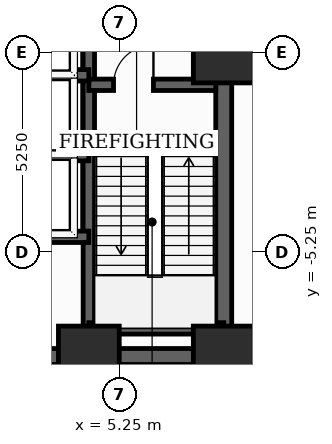
"""IFC4 building model, lengths in metres.
Left out: names, types, materials, properties, quantities, classifications, styles, units other than length and angle.
Written with IfcOpenShell. Run it as: python <this file> out.ifc"""

import sys

from ifc_helpers import new_model, si_unit, direction, frame, frame_2d, origin, origin_2d, place, context, subcontext, project, spatial, rectangle, extrude, element, fill, save


model = new_model("IFC4")
c1 = context("Model", 3, precision=1e-05, world=origin(), true_north=direction((0.0, 1.0)))
c2 = subcontext(c1, "Body", "Model", "MODEL_VIEW")
j1 = project(units=[si_unit("LENGTHUNIT", "METRE"), si_unit("PLANEANGLEUNIT", "RADIAN")], contexts=[c1])
p1 = place(None, origin())
s1 = spatial("IfcSite", under=j1, at=p1, CompositionType="ELEMENT")
p2 = place(p1, origin())
s2 = spatial("IfcBuilding", under=s1, at=p2, CompositionType="ELEMENT")
p3 = place(p2, frame((0.0, 0.0, 5.2)))
s3 = spatial("IfcBuildingStorey", under=s2, at=p3, CompositionType="ELEMENT", Elevation=5.2)
for number, where, z_axis, x_axis in (
    (1, (4.45, -8.0, 0.0), (0.0, 0.0, 1.0), (1.0, 0.0, 0.0)),
    (2, (8.0, -8.0, 0.0), (0.0, 0.0, 1.0), (1.0, 0.0, 0.0)),
    (3, (8.0, 0.0, 0.0), (0.0, 0.0, 1.0), (1.0, 0.0, 0.0)),
):
    element("IfcColumn", number, at=place(p3, frame(where, z_axis=z_axis, x_axis=x_axis)), inside=s3, PredefinedType="COLUMN", context=c2, shape_type="SweptSolid", body=[
        extrude(rectangle(XDim=1.6, YDim=1.6, at=origin_2d()), origin(), (0.0, 0.0, 1.0), 5.2),
    ])
p4 = place(p3, frame((8.0, -8.0, 0.0), z_axis=(0.0, 0.0, 1.0), x_axis=(0.0, 1.0, 0.0)))
e4 = element("IfcWall", 4, at=p4, inside=s3, PredefinedType="SHEAR", context=c2, shape_type="SweptSolid", body=[
    extrude(rectangle(XDim=16.0, YDim=0.42, at=frame_2d((8.0, 0.0))), origin(), (0.0, 0.0, 1.0), 4.95),
])
p5 = place(p4, frame((9.6, 0.0, 0.0)))
e5 = element("IfcOpeningElement", 5, at=p5, cuts=e4, PredefinedType="OPENING", context=c2, shape_type="SweptSolid", body=[
    extrude(rectangle(XDim=1.05, YDim=2.15, at=frame_2d((0.525, 1.075))), frame((0.0, 0.22, 0.0), z_axis=(0.0, -1.0, 0.0), x_axis=(1.0, 0.0, 0.0)), (0.0, 0.0, 1.0), 0.44),
])
p6 = place(p4, frame((14.148, 0.0, 0.0)))
e6 = element("IfcOpeningElement", 6, at=p6, cuts=e4, PredefinedType="OPENING", context=c2, shape_type="SweptSolid", body=[
    extrude(rectangle(XDim=0.85, YDim=2.02, at=frame_2d((0.425, 1.01))), frame((0.0, 0.22, 0.0), z_axis=(0.0, -1.0, 0.0), x_axis=(1.0, 0.0, 0.0)), (0.0, 0.0, 1.0), 0.44),
])
p7 = place(p3, frame((-8.0, -8.0, 0.0), z_axis=(0.0, 0.0, 1.0), x_axis=(1.0, 0.0, 0.0)))
e7 = element("IfcWall", 7, at=p7, inside=s3, PredefinedType="SHEAR", context=c2, shape_type="SweptSolid", body=[
    extrude(rectangle(XDim=16.0, YDim=0.42, at=frame_2d((8.0, 0.0))), origin(), (0.0, 0.0, 1.0), 4.95),
])
p8 = place(p7, frame((7.52, 0.0, 0.0)))
e8 = element("IfcOpeningElement", 8, at=p8, cuts=e7, PredefinedType="OPENING", context=c2, shape_type="SweptSolid", body=[
    extrude(rectangle(XDim=0.95, YDim=2.1, at=frame_2d((0.475, 1.05))), frame((0.0, 0.22, 0.0), z_axis=(0.0, -1.0, 0.0), x_axis=(1.0, 0.0, 0.0)), (0.0, 0.0, 1.0), 0.44),
])
p9 = place(p3, frame((4.45, -7.79, 0.0), z_axis=(0.0, 0.0, 1.0), x_axis=(0.0, 1.0, 0.0)))
e9 = element("IfcWall", 9, at=p9, inside=s3, PredefinedType="SHEAR", context=c2, shape_type="SweptSolid", body=[
    extrude(rectangle(XDim=15.58, YDim=0.3, at=frame_2d((7.79, 0.0))), origin(), (0.0, 0.0, 1.0), 4.95),
])
p10 = place(p3, frame((4.45, -0.85, 0.0), z_axis=(0.0, 0.0, 1.0), x_axis=(1.0, 0.0, 0.0)))
e10 = element("IfcWall", 10, at=p10, inside=s3, PredefinedType="SHEAR", context=c2, shape_type="SweptSolid", body=[
    extrude(rectangle(XDim=3.34, YDim=0.3, at=frame_2d((1.67, 0.0))), origin(), (0.0, 0.0, 1.0), 4.95),
])
p11 = place(p10, frame((0.65, 0.0, 0.0)))
e11 = element("IfcOpeningElement", 11, at=p11, cuts=e10, PredefinedType="OPENING", context=c2, shape_type="SweptSolid", body=[
    extrude(rectangle(XDim=1.05, YDim=2.15, at=frame_2d((0.525, 1.075))), frame((0.0, 0.16, 0.0), z_axis=(0.0, -1.0, 0.0), x_axis=(1.0, 0.0, 0.0)), (0.0, 0.0, 1.0), 0.32),
])
p12 = place(p3, frame((4.45, -7.26, 0.0), z_axis=(0.0, 0.0, 1.0), x_axis=(1.0, 0.0, 0.0)))
e12 = element("IfcWall", 12, at=p12, inside=s3, PredefinedType="SHEAR", context=c2, shape_type="SweptSolid", body=[
    extrude(rectangle(XDim=3.55, YDim=0.3, at=frame_2d((1.775, 0.0))), origin(), (0.0, 0.0, 1.0), 4.95),
])
p13 = place(p3, frame((-4.45, -4.85, 0.0), z_axis=(0.0, 0.0, 1.0), x_axis=(1.0, 0.0, 0.0)))
e13 = element("IfcWall", 13, at=p13, inside=s3, PredefinedType="SHEAR", context=c2, shape_type="SweptSolid", body=[
    extrude(rectangle(XDim=8.9, YDim=0.3, at=frame_2d((4.45, 0.0))), origin(), (0.0, 0.0, 1.0), 4.95),
])
for number, where, z_axis, x_axis in (
    (14, (1.68, -2.7, 0.0), (0.0, 0.0, 1.0), (1.0, 0.0, 0.0)),
    (15, (1.68, -0.6, 0.0), (0.0, 0.0, 1.0), (1.0, 0.0, 0.0)),
):
    element("IfcWall", number, at=place(p3, frame(where, z_axis=z_axis, x_axis=x_axis)), inside=s3, PredefinedType="SHEAR", context=c2, shape_type="SweptSolid", body=[
        extrude(rectangle(XDim=2.77, YDim=0.3, at=frame_2d((1.385, 0.0))), origin(), (0.0, 0.0, 1.0), 4.95),
    ])
p14 = place(p11, origin())
e16 = element("IfcDoor", 16, at=p14, inside=s3, OperationType="SINGLE_SWING_RIGHT", PredefinedType="DOOR", context=c2, shape_type="SweptSolid", body=[
    extrude(rectangle(XDim=1.05, YDim=2.15, at=frame_2d((0.525, 1.075))), frame((0.0, 0.025, 0.0), z_axis=(0.0, -1.0, 0.0), x_axis=(1.0, 0.0, 0.0)), (0.0, 0.0, 1.0), 0.05),
])
fill(e11, e16)
save(model, sys.argv[1])
